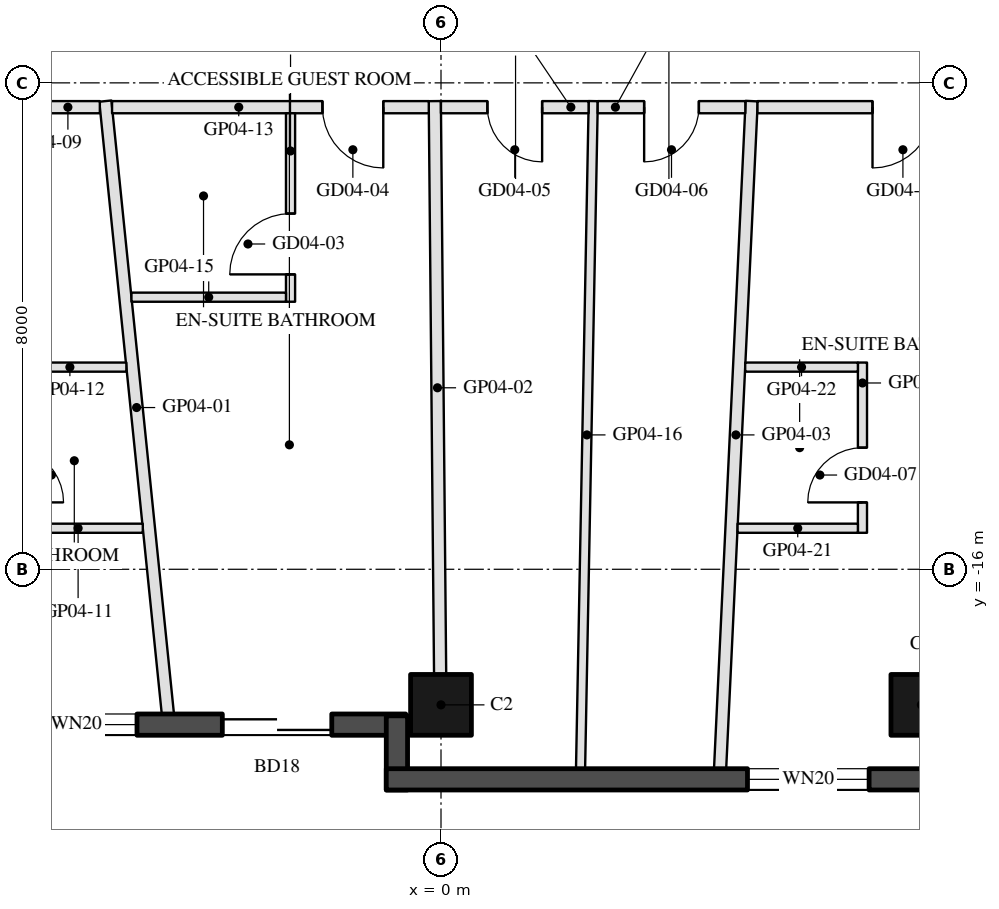
"""IFC4 building model, lengths in metres.
Left out: names, types, materials, properties, quantities, classifications, styles, units other than length and angle.
Written with IfcOpenShell. Run it as: python <this file> out.ifc"""

import sys

from ifc_helpers import new_model, si_unit, direction, frame, frame_2d, origin, origin_2d, place, context, subcontext, project, spatial, rectangle, hollow_rectangle, extrude, element, fill, save


model = new_model("IFC4")
c1 = context("Model", 3, precision=1e-05, world=origin(), true_north=direction((0.0, 1.0)))
c2 = subcontext(c1, "Body", "Model", "MODEL_VIEW")
j1 = project(units=[si_unit("LENGTHUNIT", "METRE"), si_unit("PLANEANGLEUNIT", "RADIAN")], contexts=[c1])
p1 = place(None, origin())
s1 = spatial("IfcSite", under=j1, at=p1, CompositionType="ELEMENT")
p2 = place(p1, origin())
s2 = spatial("IfcBuilding", under=s1, at=p2, CompositionType="ELEMENT")
p3 = place(p2, frame((0.0, 0.0, 76.1)))
s3 = spatial("IfcBuildingStorey", under=s2, at=p3, CompositionType="ELEMENT", Elevation=76.1)
for number, where, z_axis, x_axis in (
    (1, (0.0, -18.23, 0.0), (0.0, 0.0, 1.0), (-1.0, 0.0, 0.0)),
    (2, (7.9, -18.23, 0.0), (0.0, 0.0, 1.0), (-1.0, 0.0, 0.0)),
):
    element("IfcColumn", number, at=place(p3, frame(where, z_axis=z_axis, x_axis=x_axis)), inside=s3, PredefinedType="COLUMN", context=c2, shape_type="SweptSolid", body=[
        extrude(hollow_rectangle(XDim=1.0, YDim=1.0, WallThickness=0.045, at=origin_2d()), origin(), (0.0, 0.0, 1.0), 3.7),
    ])
p4 = place(p3, frame((-7.32, -18.555, 0.0), z_axis=(0.0, 0.0, 1.0), x_axis=(1.0, 0.0, 0.0)))
e3 = element("IfcWall", 3, at=p4, inside=s3, PredefinedType="SOLIDWALL", context=c2, shape_type="SweptSolid", body=[
    extrude(rectangle(XDim=6.74, YDim=0.35, at=frame_2d((3.37, 0.0))), origin(), (0.0, 0.0, 1.0), 3.55),
])
p5 = place(p4, frame((0.32, 0.0, 0.3)))
e4 = element("IfcOpeningElement", 4, at=p5, cuts=e3, PredefinedType="OPENING", context=c2, shape_type="SweptSolid", body=[
    extrude(rectangle(XDim=2.0, YDim=2.65, at=frame_2d((1.0, 1.325))), frame((0.0, 0.185, 0.0), z_axis=(0.0, -1.0, 0.0), x_axis=(1.0, 0.0, 0.0)), (0.0, 0.0, 1.0), 0.37),
])
p6 = place(p4, frame((3.724, 0.0, 0.0)))
e5 = element("IfcOpeningElement", 5, at=p6, cuts=e3, PredefinedType="OPENING", context=c2, shape_type="SweptSolid", body=[
    extrude(rectangle(XDim=1.8, YDim=2.4, at=frame_2d((0.9, 1.2))), frame((0.0, 0.185, 0.0), z_axis=(0.0, -1.0, 0.0), x_axis=(1.0, 0.0, 0.0)), (0.0, 0.0, 1.0), 0.37),
])
p7 = place(p3, frame((-0.725, -18.41, 0.0), z_axis=(0.0, 0.0, 1.0), x_axis=(0.0, -1.0, 0.0)))
e6 = element("IfcWall", 6, at=p7, inside=s3, PredefinedType="SOLIDWALL", context=c2, shape_type="SweptSolid", body=[
    extrude(rectangle(XDim=1.22, YDim=0.35, at=frame_2d((0.61, 0.0))), origin(), (0.0, 0.0, 1.0), 3.55),
])
p8 = place(p3, frame((-0.9, -19.455, 0.0), z_axis=(0.0, 0.0, 1.0), x_axis=(1.0, 0.0, 0.0)))
e7 = element("IfcWall", 7, at=p8, inside=s3, PredefinedType="SOLIDWALL", context=c2, shape_type="SweptSolid", body=[
    extrude(rectangle(XDim=9.7, YDim=0.35, at=frame_2d((4.85, 0.0))), origin(), (0.0, 0.0, 1.0), 3.55),
])
p9 = place(p8, frame((5.94, 0.0, 0.3)))
e8 = element("IfcOpeningElement", 8, at=p9, cuts=e7, PredefinedType="OPENING", context=c2, shape_type="SweptSolid", body=[
    extrude(rectangle(XDim=2.0, YDim=2.65, at=frame_2d((1.0, 1.325))), frame((0.0, 0.185, 0.0), z_axis=(0.0, -1.0, 0.0), x_axis=(1.0, 0.0, 0.0)), (0.0, 0.0, 1.0), 0.37),
])
p10 = place(p3, frame((-4.492, -18.38, 0.0), z_axis=(0.0, 0.0, 1.0), x_axis=(-0.101538508549, 0.994831609511, 0.0)))
e9 = element("IfcWall", 9, at=p10, inside=s3, PredefinedType="PARTITIONING", context=c2, shape_type="SweptSolid", body=[
    extrude(rectangle(XDim=10.132, YDim=0.2, at=frame_2d((5.066, 0.0))), origin(), (0.0, 0.0, 1.0), 2.96),
])
p11 = place(p3, frame((-0.014, -17.73, 0.0), z_axis=(0.0, 0.0, 1.0), x_axis=(-0.00926821032, 0.999957049216, 0.0)))
e10 = element("IfcWall", 10, at=p11, inside=s3, PredefinedType="PARTITIONING", context=c2, shape_type="SweptSolid", body=[
    extrude(rectangle(XDim=9.43, YDim=0.2, at=frame_2d((4.715, 0.0))), origin(), (0.0, 0.0, 1.0), 2.95),
])
p12 = place(p3, frame((4.59, -19.28, 0.0), z_axis=(0.0, 0.0, 1.0), x_axis=(0.04726334954, 0.998882463451, 0.0)))
e11 = element("IfcWall", 11, at=p12, inside=s3, PredefinedType="PARTITIONING", context=c2, shape_type="SweptSolid", body=[
    extrude(rectangle(XDim=10.992, YDim=0.2, at=frame_2d((5.496, 0.0))), origin(), (0.0, 0.0, 1.0), 2.96),
])
p13 = place(p3, frame((-5.611, -8.4, 0.0), z_axis=(0.0, 0.0, 1.0), x_axis=(-1.0, 0.0, 0.0)))
e12 = element("IfcWall", 12, at=p13, inside=s3, PredefinedType="PARTITIONING", context=c2, shape_type="SweptSolid", body=[
    extrude(rectangle(XDim=4.378, YDim=0.2, at=frame_2d((2.189, 0.0))), origin(), (0.0, 0.0, 1.0), 2.95),
])
p14 = place(p13, frame((1.689, 0.0, 0.0)))
e13 = element("IfcOpeningElement", 13, at=p14, cuts=e12, PredefinedType="OPENING", context=c2, shape_type="SweptSolid", body=[
    extrude(rectangle(XDim=1.0, YDim=2.1, at=frame_2d((0.5, 1.05))), frame((0.0, 0.11, 0.0), z_axis=(0.0, -1.0, 0.0), x_axis=(1.0, 0.0, 0.0)), (0.0, 0.0, 1.0), 0.22),
])
p15 = place(p3, frame((-7.032, -15.325, 0.0), z_axis=(0.0, 0.0, 1.0), x_axis=(1.0, 0.0, 0.0)))
e14 = element("IfcWall", 14, at=p15, inside=s3, PredefinedType="PARTITIONING", context=c2, shape_type="SweptSolid", body=[
    extrude(rectangle(XDim=2.128, YDim=0.15, at=frame_2d((1.064, 0.0))), origin(), (0.0, 0.0, 1.0), 3.55),
])
p16 = place(p3, frame((-7.032, -12.675, 0.0), z_axis=(0.0, 0.0, 1.0), x_axis=(1.0, 0.0, 0.0)))
e15 = element("IfcWall", 15, at=p16, inside=s3, PredefinedType="PARTITIONING", context=c2, shape_type="SweptSolid", body=[
    extrude(rectangle(XDim=1.858, YDim=0.15, at=frame_2d((0.929, 0.0))), origin(), (0.0, 0.0, 1.0), 3.55),
])
p17 = place(p3, frame((-0.201, -8.4, 0.0), z_axis=(0.0, 0.0, 1.0), x_axis=(-1.0, 0.0, 0.0)))
e16 = element("IfcWall", 16, at=p17, inside=s3, PredefinedType="PARTITIONING", context=c2, shape_type="SweptSolid", body=[
    extrude(rectangle(XDim=5.209, YDim=0.2, at=frame_2d((2.604, 0.0))), origin(), (0.0, 0.0, 1.0), 2.95),
])
p18 = place(p17, frame((0.749, 0.0, 0.0)))
e17 = element("IfcOpeningElement", 17, at=p18, cuts=e16, PredefinedType="OPENING", context=c2, shape_type="SweptSolid", body=[
    extrude(rectangle(XDim=1.0, YDim=2.1, at=frame_2d((0.5, 1.05))), frame((0.0, 0.11, 0.0), z_axis=(0.0, -1.0, 0.0), x_axis=(1.0, 0.0, 0.0)), (0.0, 0.0, 1.0), 0.22),
])
p19 = place(p3, frame((-2.475, -11.6, 0.0), z_axis=(0.0, 0.0, 1.0), x_axis=(0.0, 1.0, 0.0)))
e18 = element("IfcWall", 18, at=p19, inside=s3, PredefinedType="PARTITIONING", context=c2, shape_type="SweptSolid", body=[
    extrude(rectangle(XDim=3.1, YDim=0.15, at=frame_2d((1.55, 0.0))), origin(), (0.0, 0.0, 1.0), 3.55),
])
p20 = place(p19, frame((0.45, 0.0, 0.0)))
e19 = element("IfcOpeningElement", 19, at=p20, cuts=e18, PredefinedType="OPENING", context=c2, shape_type="SweptSolid", body=[
    extrude(rectangle(XDim=1.0, YDim=2.1, at=frame_2d((0.5, 1.05))), frame((0.0, 0.085, 0.0), z_axis=(0.0, -1.0, 0.0), x_axis=(1.0, 0.0, 0.0)), (0.0, 0.0, 1.0), 0.17),
])
p21 = place(p3, frame((-5.091, -11.525, 0.0), z_axis=(0.0, 0.0, 1.0), x_axis=(1.0, 0.0, 0.0)))
e20 = element("IfcWall", 20, at=p21, inside=s3, PredefinedType="PARTITIONING", context=c2, shape_type="SweptSolid", body=[
    extrude(rectangle(XDim=2.541, YDim=0.15, at=frame_2d((1.271, 0.0))), origin(), (0.0, 0.0, 1.0), 2.95),
])
p22 = place(p3, frame((2.295, -19.28, 0.0), z_axis=(0.0, 0.0, 1.0), x_axis=(0.01902977261, 0.999818917482, 0.0)))
e21 = element("IfcWall", 21, at=p22, inside=s3, PredefinedType="PARTITIONING", context=c2, shape_type="SweptSolid", body=[
    extrude(rectangle(XDim=10.982, YDim=0.15, at=frame_2d((5.491, 0.0))), origin(), (0.0, 0.0, 1.0), 2.96),
])
p23 = place(p3, frame((2.427, -8.4, 0.0), z_axis=(0.0, 0.0, 1.0), x_axis=(-1.0, 0.0, 0.0)))
e22 = element("IfcWall", 22, at=p23, inside=s3, PredefinedType="PARTITIONING", context=c2, shape_type="SweptSolid", body=[
    extrude(rectangle(XDim=2.428, YDim=0.2, at=frame_2d((1.214, 0.0))), origin(), (0.0, 0.0, 1.0), 2.95),
])
p24 = place(p23, frame((0.764, 0.0, 0.0)))
e23 = element("IfcOpeningElement", 23, at=p24, cuts=e22, PredefinedType="OPENING", context=c2, shape_type="SweptSolid", body=[
    extrude(rectangle(XDim=0.9, YDim=2.1, at=frame_2d((0.45, 1.05))), frame((0.0, 0.11, 0.0), z_axis=(0.0, -1.0, 0.0), x_axis=(1.0, 0.0, 0.0)), (0.0, 0.0, 1.0), 0.22),
])
p25 = place(p3, frame((5.005, -8.4, 0.0), z_axis=(0.0, 0.0, 1.0), x_axis=(-1.0, 0.0, 0.0)))
e24 = element("IfcWall", 24, at=p25, inside=s3, PredefinedType="PARTITIONING", context=c2, shape_type="SweptSolid", body=[
    extrude(rectangle(XDim=2.428, YDim=0.2, at=frame_2d((1.214, 0.0))), origin(), (0.0, 0.0, 1.0), 2.95),
])
p26 = place(p25, frame((0.764, 0.0, 0.0)))
e25 = element("IfcOpeningElement", 25, at=p26, cuts=e24, PredefinedType="OPENING", context=c2, shape_type="SweptSolid", body=[
    extrude(rectangle(XDim=0.9, YDim=2.1, at=frame_2d((0.45, 1.05))), frame((0.0, 0.11, 0.0), z_axis=(0.0, -1.0, 0.0), x_axis=(1.0, 0.0, 0.0)), (0.0, 0.0, 1.0), 0.22),
])
p27 = place(p3, frame((9.988, -8.4, 0.0), z_axis=(0.0, 0.0, 1.0), x_axis=(-1.0, 0.0, 0.0)))
e26 = element("IfcWall", 26, at=p27, inside=s3, PredefinedType="PARTITIONING", context=c2, shape_type="SweptSolid", body=[
    extrude(rectangle(XDim=4.783, YDim=0.2, at=frame_2d((2.392, 0.0))), origin(), (0.0, 0.0, 1.0), 2.95),
])
p28 = place(p27, frame((1.892, 0.0, 0.0)))
e27 = element("IfcOpeningElement", 27, at=p28, cuts=e26, PredefinedType="OPENING", context=c2, shape_type="SweptSolid", body=[
    extrude(rectangle(XDim=1.0, YDim=2.1, at=frame_2d((0.5, 1.05))), frame((0.0, 0.11, 0.0), z_axis=(0.0, -1.0, 0.0), x_axis=(1.0, 0.0, 0.0)), (0.0, 0.0, 1.0), 0.22),
])
p29 = place(p3, frame((6.931, -15.4, 0.0), z_axis=(0.0, 0.0, 1.0), x_axis=(0.0, 1.0, 0.0)))
e28 = element("IfcWall", 28, at=p29, inside=s3, PredefinedType="PARTITIONING", context=c2, shape_type="SweptSolid", body=[
    extrude(rectangle(XDim=2.8, YDim=0.15, at=frame_2d((1.4, 0.0))), origin(), (0.0, 0.0, 1.0), 3.55),
])
p30 = place(p29, frame((0.5, 0.0, 0.0)))
e29 = element("IfcOpeningElement", 29, at=p30, cuts=e28, PredefinedType="OPENING", context=c2, shape_type="SweptSolid", body=[
    extrude(rectangle(XDim=0.9, YDim=2.1, at=frame_2d((0.45, 1.05))), frame((0.0, 0.085, 0.0), z_axis=(0.0, -1.0, 0.0), x_axis=(1.0, 0.0, 0.0)), (0.0, 0.0, 1.0), 0.17),
])
p31 = place(p3, frame((4.877, -15.325, 0.0), z_axis=(0.0, 0.0, 1.0), x_axis=(1.0, 0.0, 0.0)))
e30 = element("IfcWall", 30, at=p31, inside=s3, PredefinedType="PARTITIONING", context=c2, shape_type="SweptSolid", body=[
    extrude(rectangle(XDim=1.979, YDim=0.15, at=frame_2d((0.99, 0.0))), origin(), (0.0, 0.0, 1.0), 3.55),
])
p32 = place(p3, frame((5.003, -12.675, 0.0), z_axis=(0.0, 0.0, 1.0), x_axis=(1.0, 0.0, 0.0)))
e31 = element("IfcWall", 31, at=p32, inside=s3, PredefinedType="PARTITIONING", context=c2, shape_type="SweptSolid", body=[
    extrude(rectangle(XDim=1.854, YDim=0.15, at=frame_2d((0.927, 0.0))), origin(), (0.0, 0.0, 1.0), 3.55),
])
p33 = place(p5, origin())
e32 = element("IfcWindow", 32, at=p33, inside=s3, PartitioningType="SINGLE_PANEL", PredefinedType="WINDOW", context=c2, shape_type="SweptSolid", body=[
    extrude(rectangle(XDim=2.0, YDim=2.65, at=frame_2d((1.0, 1.325))), frame((0.0, 0.03, 0.0), z_axis=(0.0, -1.0, 0.0), x_axis=(1.0, 0.0, 0.0)), (0.0, 0.0, 1.0), 0.06),
])
fill(e4, e32)
p34 = place(p6, frame((1.8, 0.0, 0.0), z_axis=(0.0, 0.0, 1.0), x_axis=(-1.0, 0.0, 0.0)))
e33 = element("IfcDoor", 33, at=p34, inside=s3, OperationType="SLIDING_TO_LEFT", PredefinedType="DOOR", context=c2, shape_type="SweptSolid", body=[
    extrude(rectangle(XDim=1.8, YDim=2.4, at=frame_2d((0.9, 1.2))), frame((0.0, 0.025, 0.0), z_axis=(0.0, -1.0, 0.0), x_axis=(1.0, 0.0, 0.0)), (0.0, 0.0, 1.0), 0.05),
])
fill(e5, e33)
p35 = place(p9, origin())
e34 = element("IfcWindow", 34, at=p35, inside=s3, PartitioningType="SINGLE_PANEL", PredefinedType="WINDOW", context=c2, shape_type="SweptSolid", body=[
    extrude(rectangle(XDim=2.0, YDim=2.65, at=frame_2d((1.0, 1.325))), frame((0.0, 0.03, 0.0), z_axis=(0.0, -1.0, 0.0), x_axis=(1.0, 0.0, 0.0)), (0.0, 0.0, 1.0), 0.06),
])
fill(e8, e34)
p36 = place(p20, origin())
e35 = element("IfcDoor", 35, at=p36, inside=s3, OperationType="SINGLE_SWING_LEFT", PredefinedType="DOOR", context=c2, shape_type="SweptSolid", body=[
    extrude(rectangle(XDim=1.0, YDim=2.1, at=frame_2d((0.5, 1.05))), frame((0.0, 0.025, 0.0), z_axis=(0.0, -1.0, 0.0), x_axis=(1.0, 0.0, 0.0)), (0.0, 0.0, 1.0), 0.05),
])
fill(e19, e35)
p37 = place(p18, origin())
e36 = element("IfcDoor", 36, at=p37, inside=s3, OperationType="SINGLE_SWING_LEFT", PredefinedType="DOOR", context=c2, shape_type="SweptSolid", body=[
    extrude(rectangle(XDim=1.0, YDim=2.1, at=frame_2d((0.5, 1.05))), frame((0.0, 0.025, 0.0), z_axis=(0.0, -1.0, 0.0), x_axis=(1.0, 0.0, 0.0)), (0.0, 0.0, 1.0), 0.05),
])
fill(e17, e36)
p38 = place(p24, origin())
e37 = element("IfcDoor", 37, at=p38, inside=s3, OperationType="SINGLE_SWING_LEFT", PredefinedType="DOOR", context=c2, shape_type="SweptSolid", body=[
    extrude(rectangle(XDim=0.9, YDim=2.1, at=frame_2d((0.45, 1.05))), frame((0.0, 0.025, 0.0), z_axis=(0.0, -1.0, 0.0), x_axis=(1.0, 0.0, 0.0)), (0.0, 0.0, 1.0), 0.05),
])
fill(e23, e37)
p39 = place(p26, origin())
e38 = element("IfcDoor", 38, at=p39, inside=s3, OperationType="SINGLE_SWING_RIGHT", PredefinedType="DOOR", context=c2, shape_type="SweptSolid", body=[
    extrude(rectangle(XDim=0.9, YDim=2.1, at=frame_2d((0.45, 1.05))), frame((0.0, 0.025, 0.0), z_axis=(0.0, -1.0, 0.0), x_axis=(1.0, 0.0, 0.0)), (0.0, 0.0, 1.0), 0.05),
])
fill(e25, e38)
p40 = place(p30, origin())
e39 = element("IfcDoor", 39, at=p40, inside=s3, OperationType="SINGLE_SWING_LEFT", PredefinedType="DOOR", context=c2, shape_type="SweptSolid", body=[
    extrude(rectangle(XDim=0.9, YDim=2.1, at=frame_2d((0.45, 1.05))), frame((0.0, 0.025, 0.0), z_axis=(0.0, -1.0, 0.0), x_axis=(1.0, 0.0, 0.0)), (0.0, 0.0, 1.0), 0.05),
])
fill(e29, e39)
p41 = place(p28, origin())
e40 = element("IfcDoor", 40, at=p41, inside=s3, OperationType="SINGLE_SWING_RIGHT", PredefinedType="DOOR", context=c2, shape_type="SweptSolid", body=[
    extrude(rectangle(XDim=1.0, YDim=2.1, at=frame_2d((0.5, 1.05))), frame((0.0, 0.025, 0.0), z_axis=(0.0, -1.0, 0.0), x_axis=(1.0, 0.0, 0.0)), (0.0, 0.0, 1.0), 0.05),
])
fill(e27, e40)
save(model, sys.argv[1])
